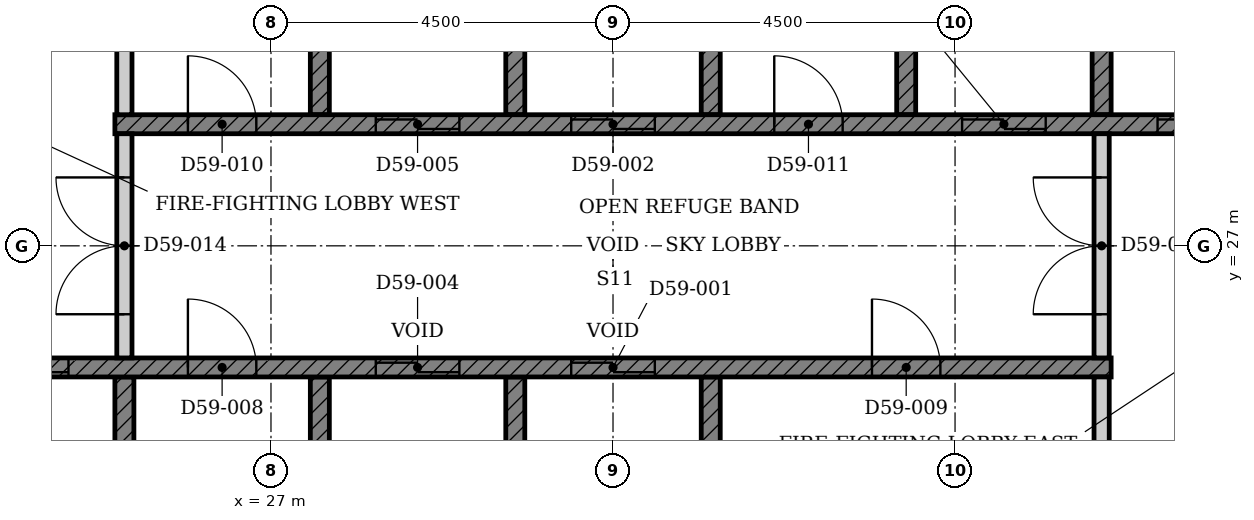
"""IFC4 building model, lengths in metres.
Left out: names, types, materials, properties, quantities, classifications, styles, units other than length and angle.
Written with IfcOpenShell. Run it as: python <this file> out.ifc"""

import sys

from ifc_helpers import new_model, si_unit, direction, frame, frame_2d, origin, place, context, subcontext, project, spatial, polyline, rectangle, outline, extrude, element, fill, save


model = new_model("IFC4")
c1 = context("Model", 3, precision=1e-05, world=origin(), true_north=direction((0.0, 1.0)))
c2 = subcontext(c1, "Body", "Model", "MODEL_VIEW")
j1 = project(units=[si_unit("LENGTHUNIT", "METRE"), si_unit("PLANEANGLEUNIT", "RADIAN")], contexts=[c1])
p1 = place(None, origin())
s1 = spatial("IfcSite", under=j1, at=p1, CompositionType="ELEMENT")
p2 = place(p1, origin())
s2 = spatial("IfcBuilding", under=s1, at=p2, CompositionType="ELEMENT")
p3 = place(p2, frame((0.0, 0.0, 233.1)))
s3 = spatial("IfcBuildingStorey", under=s2, at=p3, CompositionType="ELEMENT", Elevation=233.1)
p4 = place(p3, origin())
e1 = element("IfcWall", 1, at=p4, inside=s3, PredefinedType="SHEAR", context=c2, shape_type="SweptSolid", body=[
    extrude(outline(polyline([(22.375, 22.35), (25.197, 22.35), (25.197, 25.275), (24.947, 25.275), (24.947, 22.65), (22.625, 22.65), (22.625, 25.275), (22.375, 25.275), (22.375, 22.35)])), origin(), (0.0, 0.0, 1.0), 4.5),
])
p5 = place(p3, origin())
e2 = element("IfcWall", 2, at=p5, inside=s3, PredefinedType="SHEAR", context=c2, shape_type="SweptSolid", body=[
    extrude(outline(polyline([(27.518, 22.35), (32.911, 22.35), (32.911, 25.275), (32.661, 25.275), (32.661, 22.65), (30.339, 22.65), (30.339, 25.275), (30.089, 25.275), (30.089, 22.65), (27.768, 22.65), (27.768, 25.275), (27.518, 25.275), (27.518, 22.35)])), origin(), (0.0, 0.0, 1.0), 4.5),
])
p6 = place(p3, origin())
e3 = element("IfcWall", 3, at=p6, inside=s3, PredefinedType="SHEAR", context=c2, shape_type="SweptSolid", body=[
    extrude(outline(polyline([(27.518, 28.725), (27.768, 28.725), (27.768, 31.35), (30.089, 31.35), (30.089, 28.725), (30.339, 28.725), (30.339, 31.35), (32.661, 31.35), (32.661, 28.725), (32.911, 28.725), (32.911, 31.65), (27.518, 31.65), (27.518, 28.725)])), origin(), (0.0, 0.0, 1.0), 4.5),
])
p7 = place(p3, origin())
e4 = element("IfcWall", 4, at=p7, inside=s3, PredefinedType="SHEAR", context=c2, shape_type="SweptSolid", body=[
    extrude(outline(polyline([(35.232, 28.725), (35.482, 28.725), (35.482, 31.35), (37.803, 31.35), (37.803, 28.725), (38.053, 28.725), (38.053, 31.35), (40.375, 31.35), (40.375, 28.725), (40.625, 28.725), (40.625, 31.65), (35.232, 31.65), (35.232, 28.725)])), origin(), (0.0, 0.0, 1.0), 4.5),
])
p8 = place(p3, frame((22.375, 25.4, 0.0), z_axis=(0.0, 0.0, 1.0), x_axis=(1.0, 0.0, 0.0)))
e5 = element("IfcWall", 5, at=p8, inside=s3, PredefinedType="SHEAR", context=c2, shape_type="SweptSolid", body=[
    extrude(rectangle(XDim=15.678, YDim=0.25, at=frame_2d((7.839, 0.0))), origin(), (0.0, 0.0, 1.0), 4.5),
])
p9 = place(p8, frame((8.575, 0.0, 0.0)))
e6 = element("IfcOpeningElement", 6, at=p9, cuts=e5, PredefinedType="OPENING", context=c2, shape_type="SweptSolid", body=[
    extrude(rectangle(XDim=1.1, YDim=2.1, at=frame_2d((0.55, 1.05))), frame((0.0, 0.135, 0.0), z_axis=(0.0, -1.0, 0.0), x_axis=(1.0, 0.0, 0.0)), (0.0, 0.0, 1.0), 0.27),
])
p10 = place(p8, frame((6.004, 0.0, 0.0)))
e7 = element("IfcOpeningElement", 7, at=p10, cuts=e5, PredefinedType="OPENING", context=c2, shape_type="SweptSolid", body=[
    extrude(rectangle(XDim=1.1, YDim=2.1, at=frame_2d((0.55, 1.05))), frame((0.0, 0.135, 0.0), z_axis=(0.0, -1.0, 0.0), x_axis=(1.0, 0.0, 0.0)), (0.0, 0.0, 1.0), 0.27),
])
p11 = place(p8, frame((0.861, 0.0, 0.0)))
e8 = element("IfcOpeningElement", 8, at=p11, cuts=e5, PredefinedType="OPENING", context=c2, shape_type="SweptSolid", body=[
    extrude(rectangle(XDim=1.1, YDim=2.1, at=frame_2d((0.55, 1.05))), frame((0.0, 0.135, 0.0), z_axis=(0.0, -1.0, 0.0), x_axis=(1.0, 0.0, 0.0)), (0.0, 0.0, 1.0), 0.27),
])
p12 = place(p8, frame((3.532, 0.0, 0.0)))
e9 = element("IfcOpeningElement", 9, at=p12, cuts=e5, PredefinedType="OPENING", context=c2, shape_type="SweptSolid", body=[
    extrude(rectangle(XDim=0.9, YDim=2.1, at=frame_2d((0.45, 1.05))), frame((0.0, 0.135, 0.0), z_axis=(0.0, -1.0, 0.0), x_axis=(1.0, 0.0, 0.0)), (0.0, 0.0, 1.0), 0.27),
])
p13 = place(p8, frame((12.532, 0.0, 0.0)))
e10 = element("IfcOpeningElement", 10, at=p13, cuts=e5, PredefinedType="OPENING", context=c2, shape_type="SweptSolid", body=[
    extrude(rectangle(XDim=0.9, YDim=2.1, at=frame_2d((0.45, 1.05))), frame((0.0, 0.135, 0.0), z_axis=(0.0, -1.0, 0.0), x_axis=(1.0, 0.0, 0.0)), (0.0, 0.0, 1.0), 0.27),
])
p14 = place(p3, frame((24.947, 28.6, 0.0), z_axis=(0.0, 0.0, 1.0), x_axis=(1.0, 0.0, 0.0)))
e11 = element("IfcWall", 11, at=p14, inside=s3, PredefinedType="SHEAR", context=c2, shape_type="SweptSolid", body=[
    extrude(rectangle(XDim=15.678, YDim=0.25, at=frame_2d((7.839, 0.0))), origin(), (0.0, 0.0, 1.0), 4.5),
])
p15 = place(p14, frame((6.004, 0.0, 0.0)))
e12 = element("IfcOpeningElement", 12, at=p15, cuts=e11, PredefinedType="OPENING", context=c2, shape_type="SweptSolid", body=[
    extrude(rectangle(XDim=1.1, YDim=2.1, at=frame_2d((0.55, 1.05))), frame((0.0, 0.135, 0.0), z_axis=(0.0, -1.0, 0.0), x_axis=(1.0, 0.0, 0.0)), (0.0, 0.0, 1.0), 0.27),
])
p16 = place(p14, frame((11.146, 0.0, 0.0)))
e13 = element("IfcOpeningElement", 13, at=p16, cuts=e11, PredefinedType="OPENING", context=c2, shape_type="SweptSolid", body=[
    extrude(rectangle(XDim=1.1, YDim=2.1, at=frame_2d((0.55, 1.05))), frame((0.0, 0.135, 0.0), z_axis=(0.0, -1.0, 0.0), x_axis=(1.0, 0.0, 0.0)), (0.0, 0.0, 1.0), 0.27),
])
p17 = place(p14, frame((3.432, 0.0, 0.0)))
e14 = element("IfcOpeningElement", 14, at=p17, cuts=e11, PredefinedType="OPENING", context=c2, shape_type="SweptSolid", body=[
    extrude(rectangle(XDim=1.1, YDim=2.1, at=frame_2d((0.55, 1.05))), frame((0.0, 0.135, 0.0), z_axis=(0.0, -1.0, 0.0), x_axis=(1.0, 0.0, 0.0)), (0.0, 0.0, 1.0), 0.27),
])
p18 = place(p14, frame((13.718, 0.0, 0.0)))
e15 = element("IfcOpeningElement", 15, at=p18, cuts=e11, PredefinedType="OPENING", context=c2, shape_type="SweptSolid", body=[
    extrude(rectangle(XDim=1.1, YDim=2.1, at=frame_2d((0.55, 1.05))), frame((0.0, 0.135, 0.0), z_axis=(0.0, -1.0, 0.0), x_axis=(1.0, 0.0, 0.0)), (0.0, 0.0, 1.0), 0.27),
])
p19 = place(p14, frame((0.961, 0.0, 0.0)))
e16 = element("IfcOpeningElement", 16, at=p19, cuts=e11, PredefinedType="OPENING", context=c2, shape_type="SweptSolid", body=[
    extrude(rectangle(XDim=0.9, YDim=2.1, at=frame_2d((0.45, 1.05))), frame((0.0, 0.135, 0.0), z_axis=(0.0, -1.0, 0.0), x_axis=(1.0, 0.0, 0.0)), (0.0, 0.0, 1.0), 0.27),
])
p20 = place(p14, frame((8.675, 0.0, 0.0)))
e17 = element("IfcOpeningElement", 17, at=p20, cuts=e11, PredefinedType="OPENING", context=c2, shape_type="SweptSolid", body=[
    extrude(rectangle(XDim=0.9, YDim=2.1, at=frame_2d((0.45, 1.05))), frame((0.0, 0.135, 0.0), z_axis=(0.0, -1.0, 0.0), x_axis=(1.0, 0.0, 0.0)), (0.0, 0.0, 1.0), 0.27),
])
for number, where, z_axis, x_axis in (
    (18, (37.928, 22.65, 0.0), (0.0, 0.0, 1.0), (0.0, 1.0, 0.0)),
    (19, (25.072, 28.725, 0.0), (0.0, 0.0, 1.0), (0.0, 1.0, 0.0)),
):
    element("IfcWall", number, at=place(p3, frame(where, z_axis=z_axis, x_axis=x_axis)), inside=s3, PredefinedType="PARTITIONING", context=c2, shape_type="SweptSolid", body=[
        extrude(rectangle(XDim=2.625, YDim=0.2, at=frame_2d((1.312, 0.0))), origin(), (0.0, 0.0, 1.0), 4.5),
    ])
p21 = place(p3, frame((25.072, 25.525, 0.0), z_axis=(0.0, 0.0, 1.0), x_axis=(0.0, 1.0, 0.0)))
e20 = element("IfcWall", 20, at=p21, inside=s3, PredefinedType="PARTITIONING", context=c2, shape_type="SweptSolid", body=[
    extrude(rectangle(XDim=2.95, YDim=0.2, at=frame_2d((1.475, 0.0))), origin(), (0.0, 0.0, 1.0), 4.5),
])
p22 = place(p21, frame((0.575, 0.0, 0.0)))
e21 = element("IfcOpeningElement", 21, at=p22, cuts=e20, PredefinedType="OPENING", context=c2, shape_type="SweptSolid", body=[
    extrude(rectangle(XDim=1.8, YDim=2.1, at=frame_2d((0.9, 1.05))), frame((0.0, 0.11, 0.0), z_axis=(0.0, -1.0, 0.0), x_axis=(1.0, 0.0, 0.0)), (0.0, 0.0, 1.0), 0.22),
])
p23 = place(p3, frame((37.928, 25.525, 0.0), z_axis=(0.0, 0.0, 1.0), x_axis=(0.0, 1.0, 0.0)))
e22 = element("IfcWall", 22, at=p23, inside=s3, PredefinedType="PARTITIONING", context=c2, shape_type="SweptSolid", body=[
    extrude(rectangle(XDim=2.95, YDim=0.2, at=frame_2d((1.475, 0.0))), origin(), (0.0, 0.0, 1.0), 4.5),
])
p24 = place(p23, frame((0.575, 0.0, 0.0)))
e23 = element("IfcOpeningElement", 23, at=p24, cuts=e22, PredefinedType="OPENING", context=c2, shape_type="SweptSolid", body=[
    extrude(rectangle(XDim=1.8, YDim=2.1, at=frame_2d((0.9, 1.05))), frame((0.0, 0.11, 0.0), z_axis=(0.0, -1.0, 0.0), x_axis=(1.0, 0.0, 0.0)), (0.0, 0.0, 1.0), 0.22),
])
p25 = place(p9, origin())
e24 = element("IfcDoor", 24, at=p25, inside=s3, OperationType="DOUBLE_DOOR_SLIDING", PredefinedType="DOOR", context=c2, shape_type="SweptSolid", body=[
    extrude(rectangle(XDim=1.1, YDim=2.1, at=frame_2d((0.55, 1.05))), frame((0.0, 0.025, 0.0), z_axis=(0.0, -1.0, 0.0), x_axis=(1.0, 0.0, 0.0)), (0.0, 0.0, 1.0), 0.05),
])
fill(e6, e24)
p26 = place(p15, origin())
e25 = element("IfcDoor", 25, at=p26, inside=s3, OperationType="DOUBLE_DOOR_SLIDING", PredefinedType="DOOR", context=c2, shape_type="SweptSolid", body=[
    extrude(rectangle(XDim=1.1, YDim=2.1, at=frame_2d((0.55, 1.05))), frame((0.0, 0.025, 0.0), z_axis=(0.0, -1.0, 0.0), x_axis=(1.0, 0.0, 0.0)), (0.0, 0.0, 1.0), 0.05),
])
fill(e12, e25)
p27 = place(p16, origin())
e26 = element("IfcDoor", 26, at=p27, inside=s3, OperationType="DOUBLE_DOOR_SLIDING", PredefinedType="DOOR", context=c2, shape_type="SweptSolid", body=[
    extrude(rectangle(XDim=1.1, YDim=2.1, at=frame_2d((0.55, 1.05))), frame((0.0, 0.025, 0.0), z_axis=(0.0, -1.0, 0.0), x_axis=(1.0, 0.0, 0.0)), (0.0, 0.0, 1.0), 0.05),
])
fill(e13, e26)
p28 = place(p10, origin())
e27 = element("IfcDoor", 27, at=p28, inside=s3, OperationType="DOUBLE_DOOR_SLIDING", PredefinedType="DOOR", context=c2, shape_type="SweptSolid", body=[
    extrude(rectangle(XDim=1.1, YDim=2.1, at=frame_2d((0.55, 1.05))), frame((0.0, 0.025, 0.0), z_axis=(0.0, -1.0, 0.0), x_axis=(1.0, 0.0, 0.0)), (0.0, 0.0, 1.0), 0.05),
])
fill(e7, e27)
p29 = place(p17, origin())
e28 = element("IfcDoor", 28, at=p29, inside=s3, OperationType="DOUBLE_DOOR_SLIDING", PredefinedType="DOOR", context=c2, shape_type="SweptSolid", body=[
    extrude(rectangle(XDim=1.1, YDim=2.1, at=frame_2d((0.55, 1.05))), frame((0.0, 0.025, 0.0), z_axis=(0.0, -1.0, 0.0), x_axis=(1.0, 0.0, 0.0)), (0.0, 0.0, 1.0), 0.05),
])
fill(e14, e28)
p30 = place(p11, origin())
e29 = element("IfcDoor", 29, at=p30, inside=s3, OperationType="DOUBLE_DOOR_SLIDING", PredefinedType="DOOR", context=c2, shape_type="SweptSolid", body=[
    extrude(rectangle(XDim=1.1, YDim=2.1, at=frame_2d((0.55, 1.05))), frame((0.0, 0.025, 0.0), z_axis=(0.0, -1.0, 0.0), x_axis=(1.0, 0.0, 0.0)), (0.0, 0.0, 1.0), 0.05),
])
fill(e8, e29)
p31 = place(p18, origin())
e30 = element("IfcDoor", 30, at=p31, inside=s3, OperationType="DOUBLE_DOOR_SLIDING", PredefinedType="DOOR", context=c2, shape_type="SweptSolid", body=[
    extrude(rectangle(XDim=1.1, YDim=2.1, at=frame_2d((0.55, 1.05))), frame((0.0, 0.025, 0.0), z_axis=(0.0, -1.0, 0.0), x_axis=(1.0, 0.0, 0.0)), (0.0, 0.0, 1.0), 0.05),
])
fill(e15, e30)
p32 = place(p12, origin())
e31 = element("IfcDoor", 31, at=p32, inside=s3, OperationType="SINGLE_SWING_LEFT", PredefinedType="DOOR", context=c2, shape_type="SweptSolid", body=[
    extrude(rectangle(XDim=0.9, YDim=2.1, at=frame_2d((0.45, 1.05))), frame((0.0, 0.025, 0.0), z_axis=(0.0, -1.0, 0.0), x_axis=(1.0, 0.0, 0.0)), (0.0, 0.0, 1.0), 0.05),
])
fill(e9, e31)
p33 = place(p13, origin())
e32 = element("IfcDoor", 32, at=p33, inside=s3, OperationType="SINGLE_SWING_LEFT", PredefinedType="DOOR", context=c2, shape_type="SweptSolid", body=[
    extrude(rectangle(XDim=0.9, YDim=2.1, at=frame_2d((0.45, 1.05))), frame((0.0, 0.025, 0.0), z_axis=(0.0, -1.0, 0.0), x_axis=(1.0, 0.0, 0.0)), (0.0, 0.0, 1.0), 0.05),
])
fill(e10, e32)
p34 = place(p19, origin())
e33 = element("IfcDoor", 33, at=p34, inside=s3, OperationType="SINGLE_SWING_LEFT", PredefinedType="DOOR", context=c2, shape_type="SweptSolid", body=[
    extrude(rectangle(XDim=0.9, YDim=2.1, at=frame_2d((0.45, 1.05))), frame((0.0, 0.025, 0.0), z_axis=(0.0, -1.0, 0.0), x_axis=(1.0, 0.0, 0.0)), (0.0, 0.0, 1.0), 0.05),
])
fill(e16, e33)
p35 = place(p20, origin())
e34 = element("IfcDoor", 34, at=p35, inside=s3, OperationType="SINGLE_SWING_LEFT", PredefinedType="DOOR", context=c2, shape_type="SweptSolid", body=[
    extrude(rectangle(XDim=0.9, YDim=2.1, at=frame_2d((0.45, 1.05))), frame((0.0, 0.025, 0.0), z_axis=(0.0, -1.0, 0.0), x_axis=(1.0, 0.0, 0.0)), (0.0, 0.0, 1.0), 0.05),
])
fill(e17, e34)
p36 = place(p22, origin())
e35 = element("IfcDoor", 35, at=p36, inside=s3, OperationType="DOUBLE_DOOR_SINGLE_SWING", PredefinedType="DOOR", context=c2, shape_type="SweptSolid", body=[
    extrude(rectangle(XDim=1.8, YDim=2.1, at=frame_2d((0.9, 1.05))), frame((0.0, 0.025, 0.0), z_axis=(0.0, -1.0, 0.0), x_axis=(1.0, 0.0, 0.0)), (0.0, 0.0, 1.0), 0.05),
])
fill(e21, e35)
p37 = place(p24, origin())
e36 = element("IfcDoor", 36, at=p37, inside=s3, OperationType="DOUBLE_DOOR_SINGLE_SWING", PredefinedType="DOOR", context=c2, shape_type="SweptSolid", body=[
    extrude(rectangle(XDim=1.8, YDim=2.1, at=frame_2d((0.9, 1.05))), frame((0.0, 0.025, 0.0), z_axis=(0.0, -1.0, 0.0), x_axis=(1.0, 0.0, 0.0)), (0.0, 0.0, 1.0), 0.05),
])
fill(e23, e36)
save(model, sys.argv[1])
